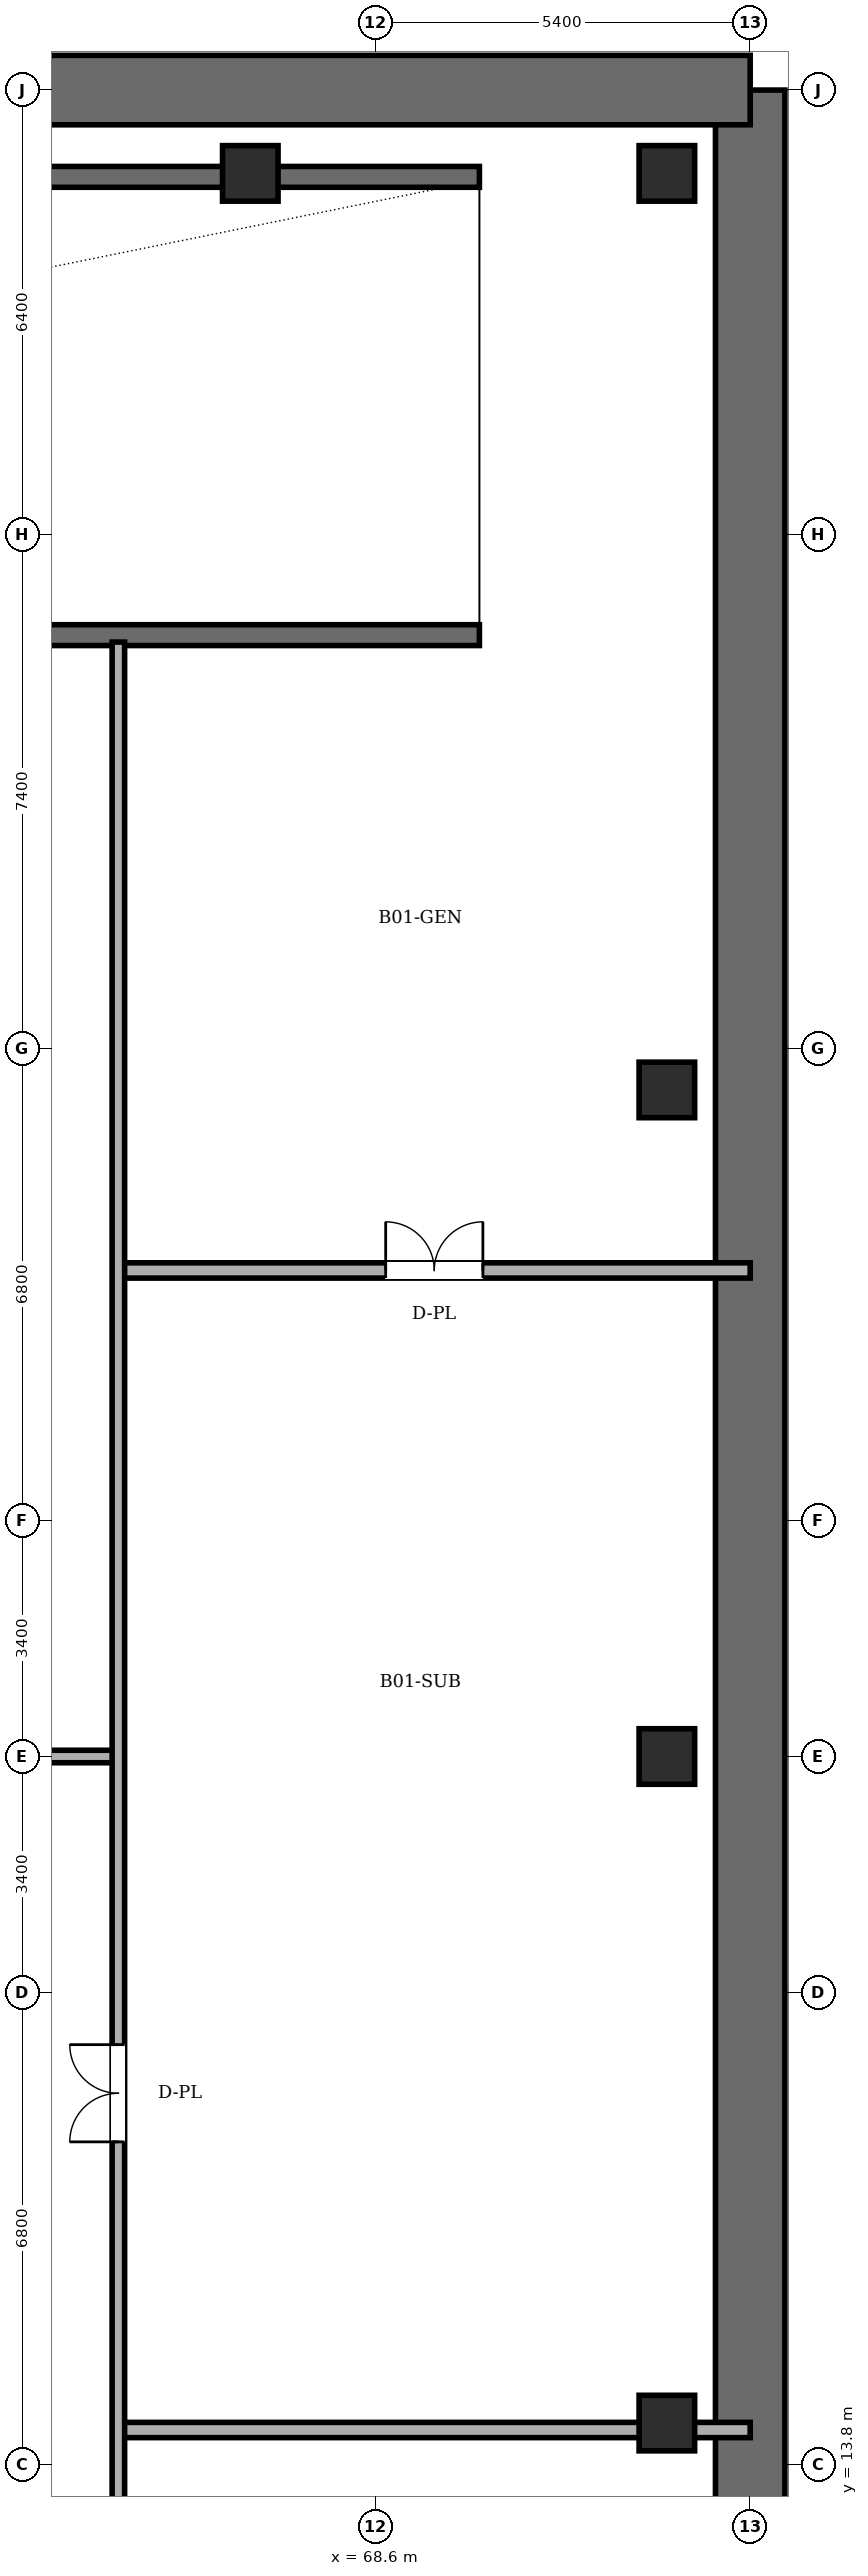
"""IFC4 building model, lengths in metres.
Left out: names, types, materials, properties, quantities, classifications, styles, units other than length and angle.
Written with IfcOpenShell. Run it as: python <this file> out.ifc"""

import sys

from ifc_helpers import new_model, si_unit, direction, frame, frame_2d, origin, origin_2d, place, context, subcontext, project, spatial, rectangle, extrude, element, fill, save


model = new_model("IFC4")
c1 = context("Model", 3, precision=1e-05, world=origin(), true_north=direction((0.0, 1.0)))
c2 = subcontext(c1, "Body", "Model", "MODEL_VIEW")
j1 = project(units=[si_unit("LENGTHUNIT", "METRE"), si_unit("PLANEANGLEUNIT", "RADIAN")], contexts=[c1])
p1 = place(None, origin())
s1 = spatial("IfcSite", under=j1, at=p1, CompositionType="ELEMENT")
p2 = place(p1, origin())
s2 = spatial("IfcBuilding", under=s1, at=p2, CompositionType="ELEMENT")
p3 = place(p2, frame((0.0, 0.0, -4.2)))
s3 = spatial("IfcBuildingStorey", under=s2, at=p3, CompositionType="ELEMENT", Elevation=-4.2)
for number, where, z_axis, x_axis in (
    (1, (72.8, 14.4, 0.0), (0.0, 0.0, 1.0), (1.0, 0.0, 0.0)),
    (2, (72.8, 24.0, 0.0), (0.0, 0.0, 1.0), (1.0, 0.0, 0.0)),
    (3, (72.8, 33.6, 0.0), (0.0, 0.0, 1.0), (1.0, 0.0, 0.0)),
    (4, (72.8, 46.8, 0.0), (0.0, 0.0, 1.0), (1.0, 0.0, 0.0)),
    (5, (66.8, 46.8, 0.0), (0.0, 0.0, 1.0), (1.0, 0.0, 0.0)),
):
    element("IfcColumn", number, at=place(p3, frame(where, z_axis=z_axis, x_axis=x_axis)), inside=s3, PredefinedType="COLUMN", context=c2, shape_type="SweptSolid", body=[
        extrude(rectangle(XDim=0.8, YDim=0.8, at=origin_2d()), origin(), (0.0, 0.0, 1.0), 4.2),
    ])
p4 = place(p3, frame((74.0, 0.0, 0.0), z_axis=(0.0, 0.0, 1.0), x_axis=(0.0, 1.0, 0.0)))
e6 = element("IfcWall", 6, at=p4, inside=s3, PredefinedType="SOLIDWALL", context=c2, shape_type="SweptSolid", body=[
    extrude(rectangle(XDim=48.0, YDim=1.0, at=frame_2d((24.0, 0.0))), origin(), (0.0, 0.0, 1.0), 3.96),
])
p5 = place(p3, frame((74.0, 48.0, 0.0), z_axis=(0.0, 0.0, 1.0), x_axis=(-1.0, 0.0, 0.0)))
e7 = element("IfcWall", 7, at=p5, inside=s3, PredefinedType="SOLIDWALL", context=c2, shape_type="SweptSolid", body=[
    extrude(rectangle(XDim=72.4, YDim=1.0, at=frame_2d((36.2, 0.0))), origin(), (0.0, 0.0, 1.0), 3.96),
])
for number, where, z_axis, x_axis in (
    (8, (37.95, 40.15, 0.0), (0.0, 0.0, 1.0), (1.0, 0.0, 0.0)),
    (9, (37.95, 46.75, 0.0), (0.0, 0.0, 1.0), (1.0, 0.0, 0.0)),
):
    element("IfcWall", number, at=place(p3, frame(where, z_axis=z_axis, x_axis=x_axis)), inside=s3, PredefinedType="SOLIDWALL", context=c2, shape_type="SweptSolid", body=[
        extrude(rectangle(XDim=32.15, YDim=0.3, at=frame_2d((16.075, 0.0))), origin(), (0.0, 0.0, 1.0), 3.96),
    ])
p6 = place(p3, frame((64.9, 14.3, 0.0), z_axis=(0.0, 0.0, 1.0), x_axis=(1.0, 0.0, 0.0)))
e10 = element("IfcWall", 10, at=p6, inside=s3, PredefinedType="PARTITIONING", context=c2, shape_type="SweptSolid", body=[
    extrude(rectangle(XDim=9.1, YDim=0.22, at=frame_2d((4.55, 0.0))), origin(), (0.0, 0.0, 1.0), 3.96),
])
p7 = place(p3, frame((58.4, 24.0, 0.0), z_axis=(0.0, 0.0, 1.0), x_axis=(1.0, 0.0, 0.0)))
e11 = element("IfcWall", 11, at=p7, inside=s3, PredefinedType="PARTITIONING", context=c2, shape_type="SweptSolid", body=[
    extrude(rectangle(XDim=6.5, YDim=0.18, at=frame_2d((3.25, 0.0))), origin(), (0.0, 0.0, 1.0), 3.96),
])
p8 = place(p3, frame((64.9, 31.0, 0.0), z_axis=(0.0, 0.0, 1.0), x_axis=(1.0, 0.0, 0.0)))
e12 = element("IfcWall", 12, at=p8, inside=s3, PredefinedType="PARTITIONING", context=c2, shape_type="SweptSolid", body=[
    extrude(rectangle(XDim=9.1, YDim=0.22, at=frame_2d((4.55, 0.0))), origin(), (0.0, 0.0, 1.0), 3.96),
])
p9 = place(p8, frame((3.85, 0.0, 0.0)))
e13 = element("IfcOpeningElement", 13, at=p9, cuts=e12, PredefinedType="OPENING", context=c2, shape_type="SweptSolid", body=[
    extrude(rectangle(XDim=1.4, YDim=2.25, at=frame_2d((0.7, 1.125))), frame((0.0, 0.12, 0.0), z_axis=(0.0, -1.0, 0.0), x_axis=(1.0, 0.0, 0.0)), (0.0, 0.0, 1.0), 0.24),
])
p10 = place(p3, frame((64.9, 8.2, 0.0), z_axis=(0.0, 0.0, 1.0), x_axis=(0.0, 1.0, 0.0)))
e14 = element("IfcWall", 14, at=p10, inside=s3, PredefinedType="PARTITIONING", context=c2, shape_type="SweptSolid", body=[
    extrude(rectangle(XDim=31.85, YDim=0.18, at=frame_2d((15.925, 0.0))), origin(), (0.0, 0.0, 1.0), 3.96),
])
p11 = place(p10, frame((10.25, 0.0, 0.0)))
e15 = element("IfcOpeningElement", 15, at=p11, cuts=e14, PredefinedType="OPENING", context=c2, shape_type="SweptSolid", body=[
    extrude(rectangle(XDim=1.4, YDim=2.25, at=frame_2d((0.7, 1.125))), frame((0.0, 0.1, 0.0), z_axis=(0.0, -1.0, 0.0), x_axis=(1.0, 0.0, 0.0)), (0.0, 0.0, 1.0), 0.2),
])
p12 = place(p11, origin())
e16 = element("IfcDoor", 16, at=p12, inside=s3, OperationType="DOUBLE_DOOR_SINGLE_SWING", PredefinedType="DOOR", context=c2, shape_type="SweptSolid", body=[
    extrude(rectangle(XDim=1.4, YDim=2.25, at=frame_2d((0.7, 1.125))), frame((0.0, 0.025, 0.0), z_axis=(0.0, -1.0, 0.0), x_axis=(1.0, 0.0, 0.0)), (0.0, 0.0, 1.0), 0.05),
])
fill(e15, e16)
p13 = place(p9, origin())
e17 = element("IfcDoor", 17, at=p13, inside=s3, OperationType="DOUBLE_DOOR_SINGLE_SWING", PredefinedType="DOOR", context=c2, shape_type="SweptSolid", body=[
    extrude(rectangle(XDim=1.4, YDim=2.25, at=frame_2d((0.7, 1.125))), frame((0.0, 0.025, 0.0), z_axis=(0.0, -1.0, 0.0), x_axis=(1.0, 0.0, 0.0)), (0.0, 0.0, 1.0), 0.05),
])
fill(e13, e17)
save(model, sys.argv[1])
